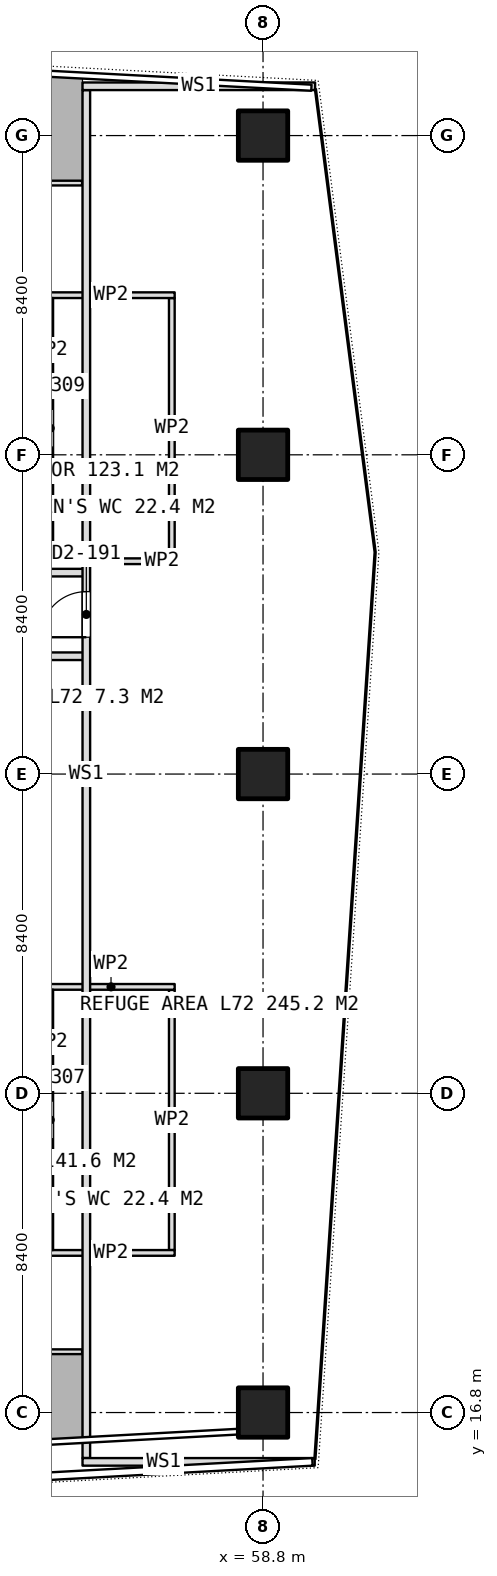
"""IFC4 building model, lengths in metres.
Left out: names, types, materials, properties, quantities, classifications, styles, units other than length and angle.
Written with IfcOpenShell. Run it as: python <this file> out.ifc"""

import sys

from ifc_helpers import new_model, si_unit, direction, frame, frame_2d, origin, origin_2d, place, context, subcontext, project, spatial, rectangle, extrude, element, fill, save


model = new_model("IFC4")
c1 = context("Model", 3, precision=1e-05, world=origin(), true_north=direction((0.0, 1.0)))
c2 = subcontext(c1, "Body", "Model", "MODEL_VIEW")
j1 = project(units=[si_unit("LENGTHUNIT", "METRE"), si_unit("PLANEANGLEUNIT", "RADIAN")], contexts=[c1])
p1 = place(None, origin())
s1 = spatial("IfcSite", under=j1, at=p1, CompositionType="ELEMENT")
p2 = place(p1, origin())
s2 = spatial("IfcBuilding", under=s1, at=p2, CompositionType="ELEMENT")
p3 = place(p2, frame((0.0, 0.0, 283.85)))
s3 = spatial("IfcBuildingStorey", under=s2, at=p3, CompositionType="ELEMENT", Elevation=283.85)
for number, where, z_axis, x_axis in (
    (1, (58.8, 16.8, 0.0), (0.0, 0.0, 1.0), (1.0, 0.0, 0.0)),
    (2, (58.8, 25.2, 0.0), (0.0, 0.0, 1.0), (1.0, 0.0, 0.0)),
    (3, (58.8, 33.6, 0.0), (0.0, 0.0, 1.0), (1.0, 0.0, 0.0)),
    (4, (58.8, 42.0, 0.0), (0.0, 0.0, 1.0), (1.0, 0.0, 0.0)),
    (5, (58.8, 50.4, 0.0), (0.0, 0.0, 1.0), (1.0, 0.0, 0.0)),
):
    element("IfcColumn", number, at=place(p3, frame(where, z_axis=z_axis, x_axis=x_axis)), inside=s3, PredefinedType="COLUMN", context=c2, shape_type="SweptSolid", body=[
        extrude(rectangle(XDim=1.3, YDim=1.3, at=origin_2d()), origin(), (0.0, 0.0, 1.0), 3.75),
    ])
for number, where, z_axis, x_axis in (
    (6, (53.125, 39.2, 0.0), (0.0, 0.0, 1.0), (1.0, 0.0, 0.0)),
    (7, (53.125, 46.2, 0.0), (0.0, 0.0, 1.0), (1.0, 0.0, 0.0)),
):
    element("IfcWall", number, at=place(p3, frame(where, z_axis=z_axis, x_axis=x_axis)), inside=s3, PredefinedType="PARTITIONING", context=c2, shape_type="SweptSolid", body=[
        extrude(rectangle(XDim=3.35, YDim=0.15, at=frame_2d((1.675, 0.0))), origin(), (0.0, 0.0, 1.0), 3.5),
    ])
p4 = place(p3, frame((53.2, 39.275, 0.0), z_axis=(0.0, 0.0, 1.0), x_axis=(0.0, 1.0, 0.0)))
e8 = element("IfcWall", 8, at=p4, inside=s3, PredefinedType="PARTITIONING", context=c2, shape_type="SweptSolid", body=[
    extrude(rectangle(XDim=6.85, YDim=0.15, at=frame_2d((3.425, 0.0))), origin(), (0.0, 0.0, 1.0), 3.5),
])
p5 = place(p4, frame((2.925, 0.0, 0.0)))
e9 = element("IfcOpeningElement", 9, at=p5, cuts=e8, PredefinedType="OPENING", context=c2, shape_type="SweptSolid", body=[
    extrude(rectangle(XDim=1.0, YDim=2.1, at=frame_2d((0.5, 1.05))), frame((0.0, 0.085, 0.0), z_axis=(0.0, -1.0, 0.0), x_axis=(1.0, 0.0, 0.0)), (0.0, 0.0, 1.0), 0.17),
])
p6 = place(p3, frame((56.4, 39.275, 0.0), z_axis=(0.0, 0.0, 1.0), x_axis=(0.0, 1.0, 0.0)))
e10 = element("IfcWall", 10, at=p6, inside=s3, PredefinedType="PARTITIONING", context=c2, shape_type="SweptSolid", body=[
    extrude(rectangle(XDim=6.85, YDim=0.15, at=frame_2d((3.425, 0.0))), origin(), (0.0, 0.0, 1.0), 3.5),
])
for number, where, z_axis, x_axis in (
    (11, (53.125, 21.0, 0.0), (0.0, 0.0, 1.0), (1.0, 0.0, 0.0)),
    (12, (53.125, 28.0, 0.0), (0.0, 0.0, 1.0), (1.0, 0.0, 0.0)),
):
    element("IfcWall", number, at=place(p3, frame(where, z_axis=z_axis, x_axis=x_axis)), inside=s3, PredefinedType="PARTITIONING", context=c2, shape_type="SweptSolid", body=[
        extrude(rectangle(XDim=3.35, YDim=0.15, at=frame_2d((1.675, 0.0))), origin(), (0.0, 0.0, 1.0), 3.5),
    ])
p7 = place(p3, frame((53.2, 21.075, 0.0), z_axis=(0.0, 0.0, 1.0), x_axis=(0.0, 1.0, 0.0)))
e13 = element("IfcWall", 13, at=p7, inside=s3, PredefinedType="PARTITIONING", context=c2, shape_type="SweptSolid", body=[
    extrude(rectangle(XDim=6.85, YDim=0.15, at=frame_2d((3.425, 0.0))), origin(), (0.0, 0.0, 1.0), 3.5),
])
p8 = place(p7, frame((2.925, 0.0, 0.0)))
e14 = element("IfcOpeningElement", 14, at=p8, cuts=e13, PredefinedType="OPENING", context=c2, shape_type="SweptSolid", body=[
    extrude(rectangle(XDim=1.0, YDim=2.1, at=frame_2d((0.5, 1.05))), frame((0.0, 0.085, 0.0), z_axis=(0.0, -1.0, 0.0), x_axis=(1.0, 0.0, 0.0)), (0.0, 0.0, 1.0), 0.17),
])
p9 = place(p3, frame((56.4, 21.075, 0.0), z_axis=(0.0, 0.0, 1.0), x_axis=(0.0, 1.0, 0.0)))
e15 = element("IfcWall", 15, at=p9, inside=s3, PredefinedType="PARTITIONING", context=c2, shape_type="SweptSolid", body=[
    extrude(rectangle(XDim=6.85, YDim=0.15, at=frame_2d((3.425, 0.0))), origin(), (0.0, 0.0, 1.0), 3.5),
])
p10 = place(p3, frame((42.674, 18.4, 0.0), z_axis=(0.0, 0.0, 1.0), x_axis=(1.0, 0.0, 0.0)))
e16 = element("IfcWall", 16, at=p10, inside=s3, PredefinedType="PARTITIONING", context=c2, shape_type="SweptSolid", body=[
    extrude(rectangle(XDim=11.365, YDim=0.125, at=frame_2d((5.683, 0.0))), origin(), (0.0, 0.0, 1.0), 3.5),
])
p11 = place(p10, frame((5.113, 0.0, 0.0)))
e17 = element("IfcOpeningElement", 17, at=p11, cuts=e16, PredefinedType="OPENING", context=c2, shape_type="SweptSolid", body=[
    extrude(rectangle(XDim=1.0, YDim=2.1, at=frame_2d((0.5, 1.05))), frame((0.0, 0.073, 0.0), z_axis=(0.0, -1.0, 0.0), x_axis=(1.0, 0.0, 0.0)), (0.0, 0.0, 1.0), 0.145),
])
p12 = place(p3, frame((54.039, 49.15, 0.0), z_axis=(0.0, 0.0, 1.0), x_axis=(-1.0, 0.0, 0.0)))
e18 = element("IfcWall", 18, at=p12, inside=s3, PredefinedType="PARTITIONING", context=c2, shape_type="SweptSolid", body=[
    extrude(rectangle(XDim=11.149, YDim=0.125, at=frame_2d((5.575, 0.0))), origin(), (0.0, 0.0, 1.0), 3.5),
])
p13 = place(p12, frame((5.145, 0.0, 0.0)))
e19 = element("IfcOpeningElement", 19, at=p13, cuts=e18, PredefinedType="OPENING", context=c2, shape_type="SweptSolid", body=[
    extrude(rectangle(XDim=1.0, YDim=2.1, at=frame_2d((0.5, 1.05))), frame((0.0, 0.073, 0.0), z_axis=(0.0, -1.0, 0.0), x_axis=(1.0, 0.0, 0.0)), (0.0, 0.0, 1.0), 0.145),
])
p14 = place(p3, frame((54.15, 15.602, 0.0), z_axis=(0.0, 0.0, 1.0), x_axis=(0.0, 1.0, 0.0)))
e20 = element("IfcWall", 20, at=p14, inside=s3, PredefinedType="PARTITIONING", context=c2, shape_type="SweptSolid", body=[
    extrude(rectangle(XDim=35.995, YDim=0.2, at=frame_2d((17.998, 0.0))), origin(), (0.0, 0.0, 1.0), 3.5),
])
p15 = place(p14, frame((21.598, 0.0, 0.0)))
e21 = element("IfcOpeningElement", 21, at=p15, cuts=e20, PredefinedType="OPENING", context=c2, shape_type="SweptSolid", body=[
    extrude(rectangle(XDim=1.2, YDim=2.1, at=frame_2d((0.6, 1.05))), frame((0.0, 0.11, 0.0), z_axis=(0.0, -1.0, 0.0), x_axis=(1.0, 0.0, 0.0)), (0.0, 0.0, 1.0), 0.22),
])
p16 = place(p3, frame((54.05, 15.502, 0.0), z_axis=(0.0, 0.0, 1.0), x_axis=(1.0, 0.0, 0.0)))
e22 = element("IfcWall", 22, at=p16, inside=s3, PredefinedType="PARTITIONING", context=c2, shape_type="SweptSolid", body=[
    extrude(rectangle(XDim=6.11, YDim=0.2, at=frame_2d((3.055, 0.0))), origin(), (0.0, 0.0, 1.0), 3.5),
])
p17 = place(p3, frame((54.05, 51.697, 0.0), z_axis=(0.0, 0.0, 1.0), x_axis=(1.0, 0.0, 0.0)))
e23 = element("IfcWall", 23, at=p17, inside=s3, PredefinedType="PARTITIONING", context=c2, shape_type="SweptSolid", body=[
    extrude(rectangle(XDim=6.12, YDim=0.2, at=frame_2d((3.06, 0.0))), origin(), (0.0, 0.0, 1.0), 3.5),
])
p18 = place(p3, frame((50.4, 38.9, 0.0), z_axis=(0.0, 0.0, 1.0), x_axis=(1.0, 0.0, 0.0)))
e24 = element("IfcWall", 24, at=p18, inside=s3, PredefinedType="PARTITIONING", context=c2, shape_type="SweptSolid", body=[
    extrude(rectangle(XDim=3.75, YDim=0.2, at=frame_2d((1.875, 0.0))), origin(), (0.0, 0.0, 1.0), 3.5),
])
p19 = place(p3, frame((50.4, 36.7, 0.0), z_axis=(0.0, 0.0, 1.0), x_axis=(1.0, 0.0, 0.0)))
e25 = element("IfcWall", 25, at=p19, inside=s3, PredefinedType="PARTITIONING", context=c2, shape_type="SweptSolid", body=[
    extrude(rectangle(XDim=3.75, YDim=0.2, at=frame_2d((1.875, 0.0))), origin(), (0.0, 0.0, 1.0), 3.5),
])
p20 = place(p19, frame((0.6, 0.0, 0.0)))
e26 = element("IfcOpeningElement", 26, at=p20, cuts=e25, PredefinedType="OPENING", context=c2, shape_type="SweptSolid", body=[
    extrude(rectangle(XDim=1.2, YDim=2.1, at=frame_2d((0.6, 1.05))), frame((0.0, 0.11, 0.0), z_axis=(0.0, -1.0, 0.0), x_axis=(1.0, 0.0, 0.0)), (0.0, 0.0, 1.0), 0.22),
])
p21 = place(p15, origin())
e27 = element("IfcDoor", 27, at=p21, inside=s3, OperationType="SINGLE_SWING_LEFT", PredefinedType="DOOR", context=c2, shape_type="SweptSolid", body=[
    extrude(rectangle(XDim=1.2, YDim=2.1, at=frame_2d((0.6, 1.05))), frame((0.0, 0.025, 0.0), z_axis=(0.0, -1.0, 0.0), x_axis=(1.0, 0.0, 0.0)), (0.0, 0.0, 1.0), 0.05),
])
fill(e21, e27)
save(model, sys.argv[1])
